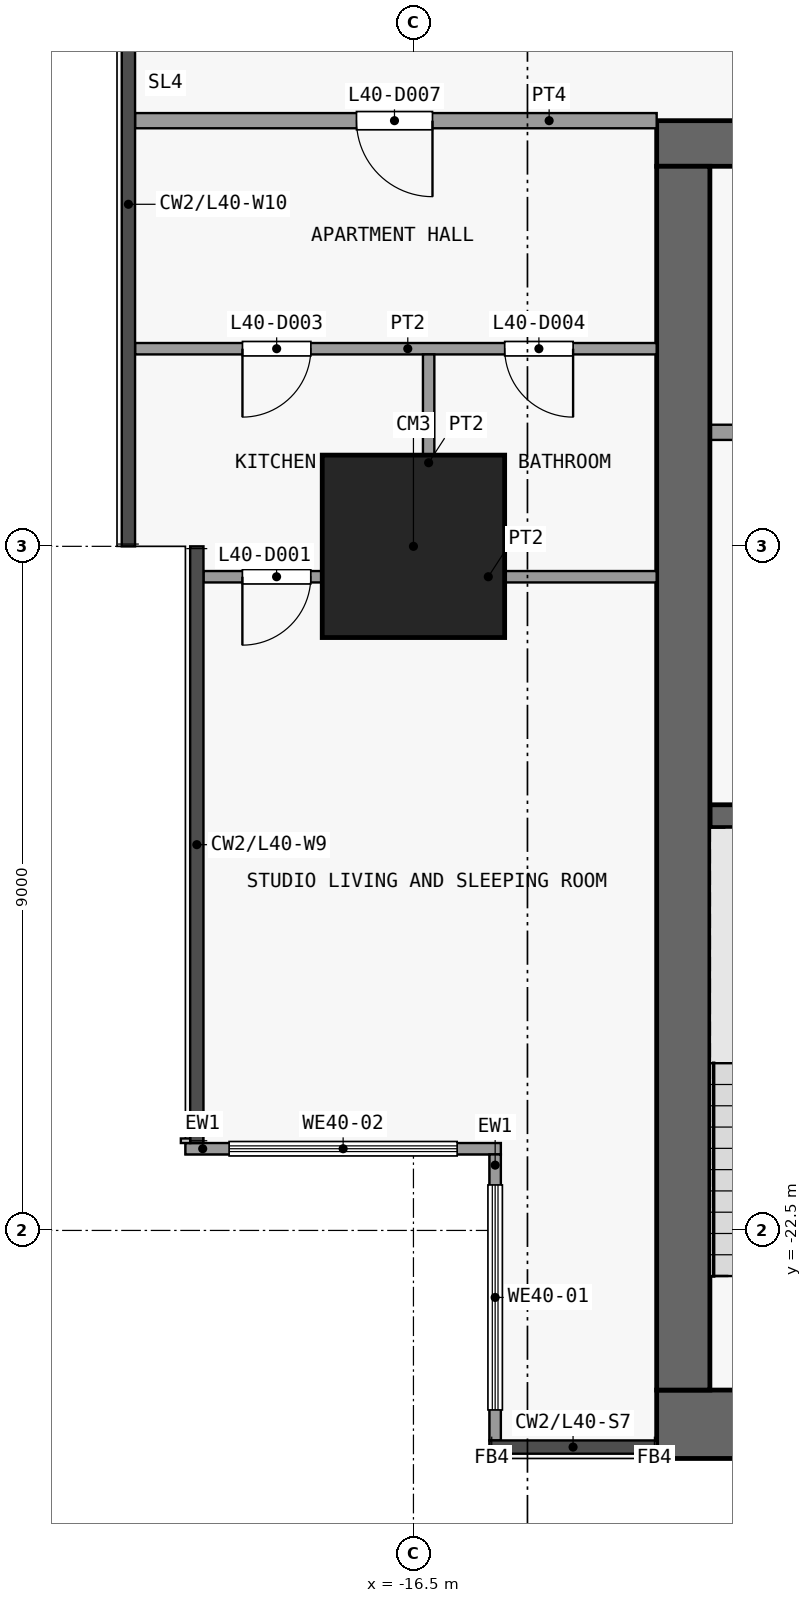
"""IFC4 building model, lengths in metres.
Left out: names, types, materials, properties, quantities, classifications, styles, units other than length and angle.
Written with IfcOpenShell. Run it as: python <this file> out.ifc"""

import sys

from ifc_helpers import new_model, si_unit, direction, frame, frame_2d, origin, origin_2d, place, context, subcontext, project, spatial, rectangle, extrude, element, fill, save


model = new_model("IFC4")
c1 = context("Model", 3, precision=1e-05, world=origin(), true_north=direction((0.0, 1.0)))
c2 = subcontext(c1, "Body", "Model", "MODEL_VIEW")
j1 = project(units=[si_unit("LENGTHUNIT", "METRE"), si_unit("PLANEANGLEUNIT", "RADIAN")], contexts=[c1])
p1 = place(None, origin())
s1 = spatial("IfcSite", under=j1, at=p1, CompositionType="ELEMENT")
p2 = place(p1, origin())
s2 = spatial("IfcBuilding", under=s1, at=p2, CompositionType="ELEMENT")
p3 = place(p2, frame((0.0, 0.0, 163.7)))
s3 = spatial("IfcBuildingStorey", under=s2, at=p3, CompositionType="ELEMENT", Elevation=163.7)
p4 = place(p3, frame((-16.5, -13.5, 0.0), z_axis=(0.0, 0.0, 1.0), x_axis=(1.0, 0.0, 0.0)))
e1 = element("IfcColumn", 1, at=p4, inside=s3, PredefinedType="COLUMN", context=c2, shape_type="SweptSolid", body=[
    extrude(rectangle(XDim=2.4, YDim=2.4, at=origin_2d()), origin(), (0.0, 0.0, 1.0), 3.6),
])
p5 = place(p3, frame((-13.3, -25.05, 0.0), z_axis=(0.0, 0.0, 1.0), x_axis=(1.0, 0.0, 0.0)))
e2 = element("IfcWall", 2, at=p5, inside=s3, PredefinedType="SHEAR", context=c2, shape_type="SweptSolid", body=[
    extrude(rectangle(XDim=26.6, YDim=0.9, at=frame_2d((13.3, 0.0))), origin(), (0.0, 0.0, 1.0), 3.3),
])
p6 = place(p3, frame((-13.3, -8.2, 0.0), z_axis=(0.0, 0.0, 1.0), x_axis=(1.0, 0.0, 0.0)))
e3 = element("IfcWall", 3, at=p6, inside=s3, PredefinedType="SHEAR", context=c2, shape_type="SweptSolid", body=[
    extrude(rectangle(XDim=26.6, YDim=0.6, at=frame_2d((13.3, 0.0))), origin(), (0.0, 0.0, 1.0), 3.3),
])
p7 = place(p6, frame((7.6, 0.0, 0.0)))
e4 = element("IfcOpeningElement", 4, at=p7, cuts=e3, PredefinedType="OPENING", context=c2, shape_type="SweptSolid", body=[
    extrude(rectangle(XDim=1.8, YDim=2.1, at=frame_2d((0.9, 1.05))), frame((0.0, 0.31, 0.0), z_axis=(0.0, -1.0, 0.0), x_axis=(1.0, 0.0, 0.0)), (0.0, 0.0, 1.0), 0.62),
])
p8 = place(p6, frame((17.2, 0.0, 0.0)))
e5 = element("IfcOpeningElement", 5, at=p8, cuts=e3, PredefinedType="OPENING", context=c2, shape_type="SweptSolid", body=[
    extrude(rectangle(XDim=1.8, YDim=2.1, at=frame_2d((0.9, 1.05))), frame((0.0, 0.31, 0.0), z_axis=(0.0, -1.0, 0.0), x_axis=(1.0, 0.0, 0.0)), (0.0, 0.0, 1.0), 0.62),
])
p9 = place(p6, frame((2.525, 0.0, 0.0)))
e6 = element("IfcOpeningElement", 6, at=p9, cuts=e3, PredefinedType="OPENING", context=c2, shape_type="SweptSolid", body=[
    extrude(rectangle(XDim=0.9, YDim=2.1, at=frame_2d((0.45, 1.05))), frame((0.0, 0.31, 0.0), z_axis=(0.0, -1.0, 0.0), x_axis=(1.0, 0.0, 0.0)), (0.0, 0.0, 1.0), 0.62),
])
p10 = place(p6, frame((23.875, 0.0, 0.0)))
e7 = element("IfcOpeningElement", 7, at=p10, cuts=e3, PredefinedType="OPENING", context=c2, shape_type="SweptSolid", body=[
    extrude(rectangle(XDim=1.2, YDim=2.1, at=frame_2d((0.6, 1.05))), frame((0.0, 0.31, 0.0), z_axis=(0.0, -1.0, 0.0), x_axis=(1.0, 0.0, 0.0)), (0.0, 0.0, 1.0), 0.62),
])
p11 = place(p3, frame((-12.95, -24.6, 0.0), z_axis=(0.0, 0.0, 1.0), x_axis=(0.0, 1.0, 0.0)))
e8 = element("IfcWall", 8, at=p11, inside=s3, PredefinedType="SHEAR", context=c2, shape_type="SweptSolid", body=[
    extrude(rectangle(XDim=16.1, YDim=0.7, at=frame_2d((8.05, 0.0))), origin(), (0.0, 0.0, 1.0), 3.3),
])
p12 = place(p3, frame((-12.6, -17.05, 0.0), z_axis=(0.0, 0.0, 1.0), x_axis=(1.0, 0.0, 0.0)))
e9 = element("IfcWall", 9, at=p12, inside=s3, PredefinedType="SHEAR", context=c2, shape_type="SweptSolid", body=[
    extrude(rectangle(XDim=3.1, YDim=0.3, at=frame_2d((1.55, 0.0))), origin(), (0.0, 0.0, 1.0), 3.3),
])
p13 = place(p3, frame((-12.6, -12.0, 0.0), z_axis=(0.0, 0.0, 1.0), x_axis=(1.0, 0.0, 0.0)))
e10 = element("IfcWall", 10, at=p13, inside=s3, PredefinedType="PARTITIONING", context=c2, shape_type="SweptSolid", body=[
    extrude(rectangle(XDim=1.45, YDim=0.2, at=frame_2d((0.725, 0.0))), origin(), (0.0, 0.0, 1.0), 3.3),
])
p14 = place(p3, frame((-15.425, -25.262, 0.0), z_axis=(0.0, 0.0, 1.0), x_axis=(0.0, 1.0, 0.0)))
e11 = element("IfcWall", 11, at=p14, inside=s3, PredefinedType="SOLIDWALL", context=c2, shape_type="SweptSolid", body=[
    extrude(rectangle(XDim=3.762, YDim=0.15, at=frame_2d((1.881, 0.0))), origin(), (0.0, 0.0, 1.0), 3.3),
])
p15 = place(p14, frame((0.401, 0.0, 0.9)))
e12 = element("IfcOpeningElement", 12, at=p15, cuts=e11, PredefinedType="OPENING", context=c2, shape_type="SweptSolid", body=[
    extrude(rectangle(XDim=2.96, YDim=2.4, at=frame_2d((1.48, 1.2))), frame((0.0, 0.085, 0.0), z_axis=(0.0, -1.0, 0.0), x_axis=(1.0, 0.0, 0.0)), (0.0, 0.0, 1.0), 0.17),
])
p16 = place(p3, frame((-15.35, -21.425, 0.0), z_axis=(0.0, 0.0, 1.0), x_axis=(-1.0, 0.0, 0.0)))
e13 = element("IfcWall", 13, at=p16, inside=s3, PredefinedType="SOLIDWALL", context=c2, shape_type="SweptSolid", body=[
    extrude(rectangle(XDim=4.15, YDim=0.15, at=frame_2d((2.075, 0.0))), origin(), (0.0, 0.0, 1.0), 3.3),
])
p17 = place(p16, frame((0.575, 0.0, 0.9)))
e14 = element("IfcOpeningElement", 14, at=p17, cuts=e13, PredefinedType="OPENING", context=c2, shape_type="SweptSolid", body=[
    extrude(rectangle(XDim=3.0, YDim=2.4, at=frame_2d((1.5, 1.2))), frame((0.0, 0.085, 0.0), z_axis=(0.0, -1.0, 0.0), x_axis=(1.0, 0.0, 0.0)), (0.0, 0.0, 1.0), 0.17),
])
p18 = place(p3, frame((-19.262, -13.9, 0.0), z_axis=(0.0, 0.0, 1.0), x_axis=(1.0, 0.0, 0.0)))
e15 = element("IfcWall", 15, at=p18, inside=s3, PredefinedType="PARTITIONING", context=c2, shape_type="SweptSolid", body=[
    extrude(rectangle(XDim=5.962, YDim=0.15, at=frame_2d((2.981, 0.0))), origin(), (0.0, 0.0, 1.0), 3.3),
])
p19 = place(p18, frame((0.512, 0.0, 0.0)))
e16 = element("IfcOpeningElement", 16, at=p19, cuts=e15, PredefinedType="OPENING", context=c2, shape_type="SweptSolid", body=[
    extrude(rectangle(XDim=0.9, YDim=2.1, at=frame_2d((0.45, 1.05))), frame((0.0, 0.085, 0.0), z_axis=(0.0, -1.0, 0.0), x_axis=(1.0, 0.0, 0.0)), (0.0, 0.0, 1.0), 0.17),
])
p20 = place(p3, frame((-20.163, -10.9, 0.0), z_axis=(0.0, 0.0, 1.0), x_axis=(1.0, 0.0, 0.0)))
e17 = element("IfcWall", 17, at=p20, inside=s3, PredefinedType="PARTITIONING", context=c2, shape_type="SweptSolid", body=[
    extrude(rectangle(XDim=6.863, YDim=0.15, at=frame_2d((3.431, 0.0))), origin(), (0.0, 0.0, 1.0), 3.3),
])
p21 = place(p20, frame((1.413, 0.0, 0.0)))
e18 = element("IfcOpeningElement", 18, at=p21, cuts=e17, PredefinedType="OPENING", context=c2, shape_type="SweptSolid", body=[
    extrude(rectangle(XDim=0.9, YDim=2.1, at=frame_2d((0.45, 1.05))), frame((0.0, 0.085, 0.0), z_axis=(0.0, -1.0, 0.0), x_axis=(1.0, 0.0, 0.0)), (0.0, 0.0, 1.0), 0.17),
])
p22 = place(p20, frame((4.863, 0.0, 0.0)))
e19 = element("IfcOpeningElement", 19, at=p22, cuts=e17, PredefinedType="OPENING", context=c2, shape_type="SweptSolid", body=[
    extrude(rectangle(XDim=0.9, YDim=2.1, at=frame_2d((0.45, 1.05))), frame((0.0, 0.085, 0.0), z_axis=(0.0, -1.0, 0.0), x_axis=(1.0, 0.0, 0.0)), (0.0, 0.0, 1.0), 0.17),
])
p23 = place(p3, frame((-20.163, -7.9, 0.0), z_axis=(0.0, 0.0, 1.0), x_axis=(1.0, 0.0, 0.0)))
e20 = element("IfcWall", 20, at=p23, inside=s3, PredefinedType="PARTITIONING", context=c2, shape_type="SweptSolid", body=[
    extrude(rectangle(XDim=6.863, YDim=0.2, at=frame_2d((3.431, 0.0))), origin(), (0.0, 0.0, 1.0), 3.3),
])
p24 = place(p23, frame((2.913, 0.0, 0.0)))
e21 = element("IfcOpeningElement", 21, at=p24, cuts=e20, PredefinedType="OPENING", context=c2, shape_type="SweptSolid", body=[
    extrude(rectangle(XDim=1.0, YDim=2.1, at=frame_2d((0.5, 1.05))), frame((0.0, 0.11, 0.0), z_axis=(0.0, -1.0, 0.0), x_axis=(1.0, 0.0, 0.0)), (0.0, 0.0, 1.0), 0.22),
])
p25 = place(p3, frame((-16.3, -13.825, 0.0), z_axis=(0.0, 0.0, 1.0), x_axis=(0.0, 1.0, 0.0)))
e22 = element("IfcWall", 22, at=p25, inside=s3, PredefinedType="PARTITIONING", context=c2, shape_type="SweptSolid", body=[
    extrude(rectangle(XDim=2.85, YDim=0.15, at=frame_2d((1.425, 0.0))), origin(), (0.0, 0.0, 1.0), 3.3),
])
p26 = place(p15, origin())
e23 = element("IfcWindow", 23, at=p26, inside=s3, PartitioningType="SINGLE_PANEL", PredefinedType="WINDOW", context=c2, shape_type="SweptSolid", body=[
    extrude(rectangle(XDim=2.96, YDim=2.4, at=frame_2d((1.48, 1.2))), frame((0.0, 0.03, 0.0), z_axis=(0.0, -1.0, 0.0), x_axis=(1.0, 0.0, 0.0)), (0.0, 0.0, 1.0), 0.06),
])
fill(e12, e23)
p27 = place(p17, origin())
e24 = element("IfcWindow", 24, at=p27, inside=s3, PartitioningType="SINGLE_PANEL", PredefinedType="WINDOW", context=c2, shape_type="SweptSolid", body=[
    extrude(rectangle(XDim=3.0, YDim=2.4, at=frame_2d((1.5, 1.2))), frame((0.0, 0.03, 0.0), z_axis=(0.0, -1.0, 0.0), x_axis=(1.0, 0.0, 0.0)), (0.0, 0.0, 1.0), 0.06),
])
fill(e14, e24)
p28 = place(p19, origin())
e25 = element("IfcDoor", 25, at=p28, inside=s3, OperationType="SINGLE_SWING_LEFT", PredefinedType="DOOR", context=c2, shape_type="SweptSolid", body=[
    extrude(rectangle(XDim=0.9, YDim=2.1, at=frame_2d((0.45, 1.05))), frame((0.0, 0.025, 0.0), z_axis=(0.0, -1.0, 0.0), x_axis=(1.0, 0.0, 0.0)), (0.0, 0.0, 1.0), 0.05),
])
fill(e16, e25)
p29 = place(p21, origin())
e26 = element("IfcDoor", 26, at=p29, inside=s3, OperationType="SINGLE_SWING_LEFT", PredefinedType="DOOR", context=c2, shape_type="SweptSolid", body=[
    extrude(rectangle(XDim=0.9, YDim=2.1, at=frame_2d((0.45, 1.05))), frame((0.0, 0.025, 0.0), z_axis=(0.0, -1.0, 0.0), x_axis=(1.0, 0.0, 0.0)), (0.0, 0.0, 1.0), 0.05),
])
fill(e18, e26)
p30 = place(p22, origin())
e27 = element("IfcDoor", 27, at=p30, inside=s3, OperationType="SINGLE_SWING_RIGHT", PredefinedType="DOOR", context=c2, shape_type="SweptSolid", body=[
    extrude(rectangle(XDim=0.9, YDim=2.1, at=frame_2d((0.45, 1.05))), frame((0.0, 0.025, 0.0), z_axis=(0.0, -1.0, 0.0), x_axis=(1.0, 0.0, 0.0)), (0.0, 0.0, 1.0), 0.05),
])
fill(e19, e27)
p31 = place(p24, origin())
e28 = element("IfcDoor", 28, at=p31, inside=s3, OperationType="SINGLE_SWING_RIGHT", PredefinedType="DOOR", context=c2, shape_type="SweptSolid", body=[
    extrude(rectangle(XDim=1.0, YDim=2.1, at=frame_2d((0.5, 1.05))), frame((0.0, 0.025, 0.0), z_axis=(0.0, -1.0, 0.0), x_axis=(1.0, 0.0, 0.0)), (0.0, 0.0, 1.0), 0.05),
])
fill(e21, e28)
save(model, sys.argv[1])
